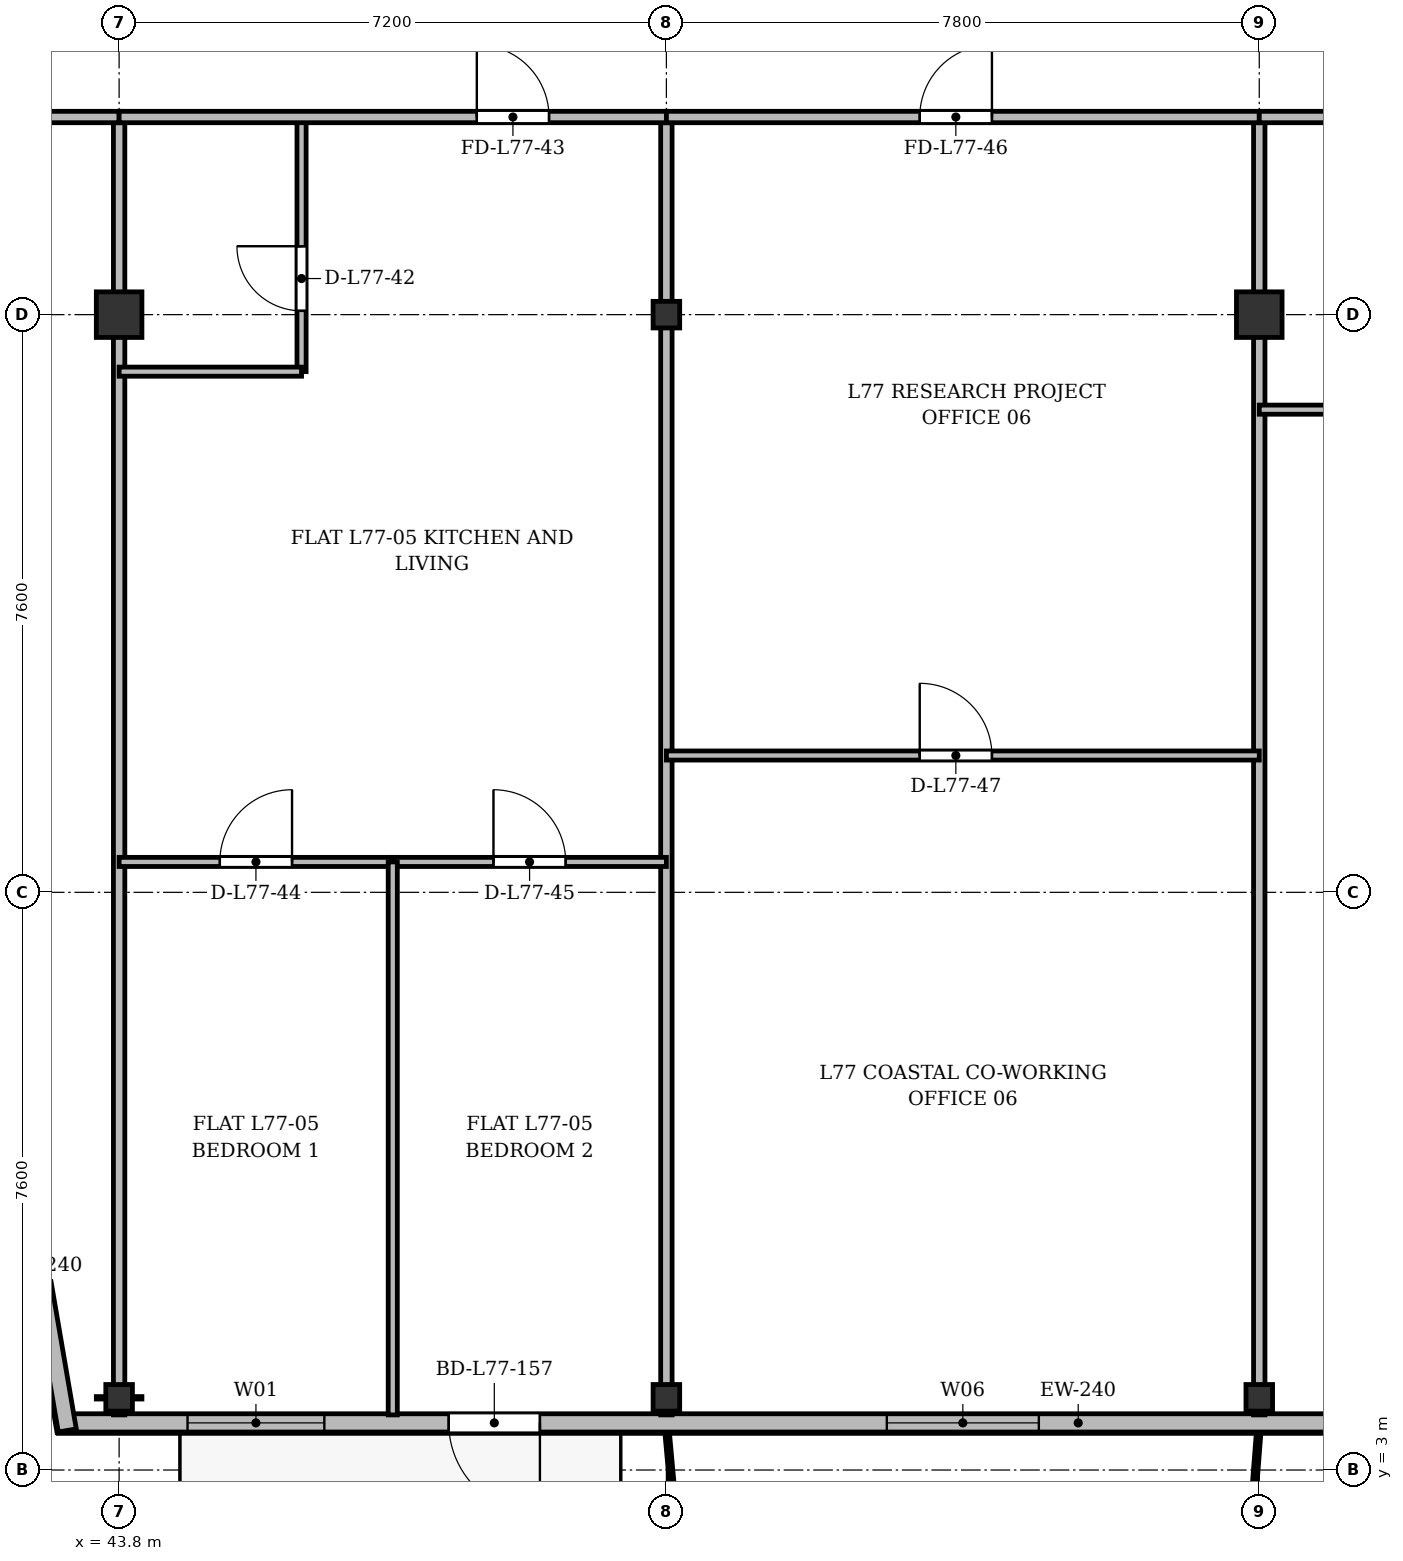
"""IFC4 building model, lengths in metres.
Left out: names, types, materials, properties, quantities, classifications, styles, units other than length and angle.
Written with IfcOpenShell. Run it as: python <this file> out.ifc"""

import sys

from ifc_helpers import new_model, si_unit, direction, frame, frame_2d, origin, origin_2d, place, context, subcontext, project, spatial, rectangle, i_section, extrude, source, transform, mapped, element, fill, save


model = new_model("IFC4")
c1 = context("Model", 3, precision=1e-05, world=origin(), true_north=direction((0.0, 1.0)))
c2 = subcontext(c1, "Body", "Model", "MODEL_VIEW")
j1 = project(units=[si_unit("LENGTHUNIT", "METRE"), si_unit("PLANEANGLEUNIT", "RADIAN")], contexts=[c1])
p1 = place(None, origin())
s1 = spatial("IfcSite", under=j1, at=p1, CompositionType="ELEMENT")
p2 = place(p1, origin())
s2 = spatial("IfcBuilding", under=s1, at=p2, CompositionType="ELEMENT")
p3 = place(p2, frame((0.0, 0.0, 295.5)))
s3 = spatial("IfcBuildingStorey", under=s2, at=p3, CompositionType="ELEMENT", Elevation=295.5)
m1 = source(origin(), c2, "Body", "SweptSolid", [
    extrude(i_section(OverallWidth=0.35, OverallDepth=0.35, WebThickness=0.018, FlangeThickness=0.028, at=origin_2d()), origin(), (0.0, 0.0, 1.0), 3.6),
])
p4 = place(p3, frame((43.8, 3.95, 0.0), z_axis=(0.0, 0.0, 1.0), x_axis=(1.0, 0.0, 0.0)))
e1 = element("IfcColumn", 1, at=p4, inside=s3, PredefinedType="COLUMN", context=c2, shape_type="MappedRepresentation", body=[
    mapped(m1, transform((0.0, 0.0, 0.0), x_axis=(1.0, 0.0, 0.0), y_axis=(0.0, 1.0, 0.0), z_axis=(0.0, 0.0, 1.0), scale=1.0)),
])
m2 = source(origin(), c2, "Body", "SweptSolid", [
    extrude(rectangle(XDim=0.6, YDim=0.6, at=origin_2d()), origin(), (0.0, 0.0, 1.0), 3.6),
])
p5 = place(p3, frame((43.8, 18.2, 0.0), z_axis=(0.0, 0.0, 1.0), x_axis=(1.0, 0.0, 0.0)))
e2 = element("IfcColumn", 2, at=p5, inside=s3, PredefinedType="COLUMN", context=c2, shape_type="MappedRepresentation", body=[
    mapped(m2, transform((0.0, 0.0, 0.0), x_axis=(1.0, 0.0, 0.0), y_axis=(0.0, 1.0, 0.0), z_axis=(0.0, 0.0, 1.0), scale=1.0)),
])
for number, where, z_axis, x_axis in (
    (3, (51.0, 3.95, 0.0), (0.0, 0.0, 1.0), (1.0, 0.0, 0.0)),
    (4, (51.0, 18.2, 0.0), (0.0, 0.0, 1.0), (1.0, 0.0, 0.0)),
    (5, (58.8, 3.95, 0.0), (0.0, 0.0, 1.0), (1.0, 0.0, 0.0)),
):
    element("IfcColumn", number, at=place(p3, frame(where, z_axis=z_axis, x_axis=x_axis)), inside=s3, PredefinedType="COLUMN", context=c2, shape_type="MappedRepresentation", body=[
        mapped(m1, transform((0.0, 0.0, 0.0), x_axis=(1.0, 0.0, 0.0), y_axis=(0.0, 1.0, 0.0), z_axis=(0.0, 0.0, 1.0), scale=1.0)),
    ])
p6 = place(p3, frame((58.8, 18.2, 0.0), z_axis=(0.0, 0.0, 1.0), x_axis=(1.0, 0.0, 0.0)))
e6 = element("IfcColumn", 6, at=p6, inside=s3, PredefinedType="COLUMN", context=c2, shape_type="MappedRepresentation", body=[
    mapped(m2, transform((0.0, 0.0, 0.0), x_axis=(1.0, 0.0, 0.0), y_axis=(0.0, 1.0, 0.0), z_axis=(0.0, 0.0, 1.0), scale=1.0)),
])
p7 = place(p3, frame((63.2, 3.62, 0.0), z_axis=(0.0, 0.0, 1.0), x_axis=(-1.0, 0.0, 0.0)))
e7 = element("IfcWall", 7, at=p7, inside=s3, PredefinedType="SOLIDWALL", context=c2, shape_type="SweptSolid", body=[
    extrude(rectangle(XDim=20.2, YDim=0.24, at=frame_2d((10.1, 0.0))), origin(), (0.0, 0.0, 1.0), 3.26),
])
p8 = place(p7, frame((1.495, 0.0, 0.9)))
e8 = element("IfcOpeningElement", 8, at=p8, cuts=e7, PredefinedType="OPENING", context=c2, shape_type="SweptSolid", body=[
    extrude(rectangle(XDim=1.5, YDim=1.75, at=frame_2d((0.75, 0.875))), frame((0.0, 0.13, 0.0), z_axis=(0.0, -1.0, 0.0), x_axis=(1.0, 0.0, 0.0)), (0.0, 0.0, 1.0), 0.26),
])
p9 = place(p7, frame((7.3, 0.0, 0.9)))
e9 = element("IfcOpeningElement", 9, at=p9, cuts=e7, PredefinedType="OPENING", context=c2, shape_type="SweptSolid", body=[
    extrude(rectangle(XDim=2.0, YDim=1.95, at=frame_2d((1.0, 0.975))), frame((0.0, 0.13, 0.0), z_axis=(0.0, -1.0, 0.0), x_axis=(1.0, 0.0, 0.0)), (0.0, 0.0, 1.0), 0.26),
])
p10 = place(p7, frame((13.864, 0.0, 0.0)))
e10 = element("IfcOpeningElement", 10, at=p10, cuts=e7, PredefinedType="OPENING", context=c2, shape_type="SweptSolid", body=[
    extrude(rectangle(XDim=1.2, YDim=2.2, at=frame_2d((0.6, 1.1))), frame((0.0, 0.13, 0.0), z_axis=(0.0, -1.0, 0.0), x_axis=(1.0, 0.0, 0.0)), (0.0, 0.0, 1.0), 0.26),
])
p11 = place(p7, frame((16.7, 0.0, 0.9)))
e11 = element("IfcOpeningElement", 11, at=p11, cuts=e7, PredefinedType="OPENING", context=c2, shape_type="SweptSolid", body=[
    extrude(rectangle(XDim=1.8, YDim=1.8, at=frame_2d((0.9, 0.9))), frame((0.0, 0.13, 0.0), z_axis=(0.0, -1.0, 0.0), x_axis=(1.0, 0.0, 0.0)), (0.0, 0.0, 1.0), 0.26),
])
p12 = place(p3, frame((43.118, 3.52, 0.0), z_axis=(0.0, 0.0, 1.0), x_axis=(-0.168990530437, 0.98561767467, 0.0)))
e12 = element("IfcWall", 12, at=p12, inside=s3, PredefinedType="SOLIDWALL", context=c2, shape_type="SweptSolid", body=[
    extrude(rectangle(XDim=3.551, YDim=0.24, at=frame_2d((1.775, 0.0))), origin(), (0.0, 0.0, 1.0), 2.81),
])
for number, where, z_axis, x_axis in (
    (13, (43.8, 3.725, 0.0), (0.0, 0.0, 1.0), (0.0, 1.0, 0.0)),
    (14, (51.0, 3.725, 0.0), (0.0, 0.0, 1.0), (0.0, 1.0, 0.0)),
    (15, (58.8, 3.725, 0.0), (0.0, 0.0, 1.0), (0.0, 1.0, 0.0)),
):
    element("IfcWall", number, at=place(p3, frame(where, z_axis=z_axis, x_axis=x_axis)), inside=s3, PredefinedType="PARTITIONING", context=c2, shape_type="SweptSolid", body=[
        extrude(rectangle(XDim=17.075, YDim=0.15, at=frame_2d((8.538, 0.0))), origin(), (0.0, 0.0, 1.0), 2.76),
    ])
p13 = place(p3, frame((33.2, 20.8, 0.0), z_axis=(0.0, 0.0, 1.0), x_axis=(1.0, 0.0, 0.0)))
e16 = element("IfcWall", 16, at=p13, inside=s3, PredefinedType="PARTITIONING", context=c2, shape_type="SweptSolid", body=[
    extrude(rectangle(XDim=10.6, YDim=0.15, at=frame_2d((5.3, 0.0))), origin(), (0.0, 0.0, 1.0), 2.76),
])
p14 = place(p13, frame((4.408, 0.0, 0.0)))
e17 = element("IfcOpeningElement", 17, at=p14, cuts=e16, PredefinedType="OPENING", context=c2, shape_type="SweptSolid", body=[
    extrude(rectangle(XDim=1.6, YDim=2.2, at=frame_2d((0.8, 1.1))), frame((0.0, 0.085, 0.0), z_axis=(0.0, -1.0, 0.0), x_axis=(1.0, 0.0, 0.0)), (0.0, 0.0, 1.0), 0.17),
])
p15 = place(p3, frame((46.2, 17.45, 0.0), z_axis=(0.0, 0.0, 1.0), x_axis=(0.0, 1.0, 0.0)))
e18 = element("IfcWall", 18, at=p15, inside=s3, PredefinedType="PARTITIONING", context=c2, shape_type="SweptSolid", body=[
    extrude(rectangle(XDim=3.35, YDim=0.12, at=frame_2d((1.675, 0.0))), origin(), (0.0, 0.0, 1.0), 2.81),
])
p16 = place(p15, frame((0.8, 0.0, 0.0)))
e19 = element("IfcOpeningElement", 19, at=p16, cuts=e18, PredefinedType="OPENING", context=c2, shape_type="SweptSolid", body=[
    extrude(rectangle(XDim=0.85, YDim=2.1, at=frame_2d((0.425, 1.05))), frame((0.0, 0.07, 0.0), z_axis=(0.0, -1.0, 0.0), x_axis=(1.0, 0.0, 0.0)), (0.0, 0.0, 1.0), 0.14),
])
p17 = place(p3, frame((43.8, 17.45, 0.0), z_axis=(0.0, 0.0, 1.0), x_axis=(1.0, 0.0, 0.0)))
e20 = element("IfcWall", 20, at=p17, inside=s3, PredefinedType="PARTITIONING", context=c2, shape_type="SweptSolid", body=[
    extrude(rectangle(XDim=2.4, YDim=0.12, at=frame_2d((1.2, 0.0))), origin(), (0.0, 0.0, 1.0), 2.76),
])
p18 = place(p3, frame((43.8, 20.8, 0.0), z_axis=(0.0, 0.0, 1.0), x_axis=(1.0, 0.0, 0.0)))
e21 = element("IfcWall", 21, at=p18, inside=s3, PredefinedType="PARTITIONING", context=c2, shape_type="SweptSolid", body=[
    extrude(rectangle(XDim=7.2, YDim=0.15, at=frame_2d((3.6, 0.0))), origin(), (0.0, 0.0, 1.0), 2.76),
])
p19 = place(p18, frame((4.706, 0.0, 0.0)))
e22 = element("IfcOpeningElement", 22, at=p19, cuts=e21, PredefinedType="OPENING", context=c2, shape_type="SweptSolid", body=[
    extrude(rectangle(XDim=0.95, YDim=2.15, at=frame_2d((0.475, 1.075))), frame((0.0, 0.085, 0.0), z_axis=(0.0, -1.0, 0.0), x_axis=(1.0, 0.0, 0.0)), (0.0, 0.0, 1.0), 0.17),
])
p20 = place(p3, frame((43.8, 11.0, 0.0), z_axis=(0.0, 0.0, 1.0), x_axis=(1.0, 0.0, 0.0)))
e23 = element("IfcWall", 23, at=p20, inside=s3, PredefinedType="PARTITIONING", context=c2, shape_type="SweptSolid", body=[
    extrude(rectangle(XDim=3.6, YDim=0.12, at=frame_2d((1.8, 0.0))), origin(), (0.0, 0.0, 1.0), 2.76),
])
p21 = place(p20, frame((1.325, 0.0, 0.0)))
e24 = element("IfcOpeningElement", 24, at=p21, cuts=e23, PredefinedType="OPENING", context=c2, shape_type="SweptSolid", body=[
    extrude(rectangle(XDim=0.95, YDim=2.15, at=frame_2d((0.475, 1.075))), frame((0.0, 0.07, 0.0), z_axis=(0.0, -1.0, 0.0), x_axis=(1.0, 0.0, 0.0)), (0.0, 0.0, 1.0), 0.14),
])
p22 = place(p3, frame((47.4, 11.0, 0.0), z_axis=(0.0, 0.0, 1.0), x_axis=(1.0, 0.0, 0.0)))
e25 = element("IfcWall", 25, at=p22, inside=s3, PredefinedType="PARTITIONING", context=c2, shape_type="SweptSolid", body=[
    extrude(rectangle(XDim=3.6, YDim=0.12, at=frame_2d((1.8, 0.0))), origin(), (0.0, 0.0, 1.0), 2.76),
])
p23 = place(p22, frame((1.325, 0.0, 0.0)))
e26 = element("IfcOpeningElement", 26, at=p23, cuts=e25, PredefinedType="OPENING", context=c2, shape_type="SweptSolid", body=[
    extrude(rectangle(XDim=0.95, YDim=2.15, at=frame_2d((0.475, 1.075))), frame((0.0, 0.07, 0.0), z_axis=(0.0, -1.0, 0.0), x_axis=(1.0, 0.0, 0.0)), (0.0, 0.0, 1.0), 0.14),
])
p24 = place(p3, frame((47.4, 3.725, 0.0), z_axis=(0.0, 0.0, 1.0), x_axis=(0.0, 1.0, 0.0)))
e27 = element("IfcWall", 27, at=p24, inside=s3, PredefinedType="PARTITIONING", context=c2, shape_type="SweptSolid", body=[
    extrude(rectangle(XDim=7.275, YDim=0.12, at=frame_2d((3.637, 0.0))), origin(), (0.0, 0.0, 1.0), 2.81),
])
p25 = place(p3, frame((51.0, 20.8, 0.0), z_axis=(0.0, 0.0, 1.0), x_axis=(1.0, 0.0, 0.0)))
e28 = element("IfcWall", 28, at=p25, inside=s3, PredefinedType="PARTITIONING", context=c2, shape_type="SweptSolid", body=[
    extrude(rectangle(XDim=7.8, YDim=0.15, at=frame_2d((3.9, 0.0))), origin(), (0.0, 0.0, 1.0), 2.76),
])
p26 = place(p25, frame((3.333, 0.0, 0.0)))
e29 = element("IfcOpeningElement", 29, at=p26, cuts=e28, PredefinedType="OPENING", context=c2, shape_type="SweptSolid", body=[
    extrude(rectangle(XDim=0.95, YDim=2.15, at=frame_2d((0.475, 1.075))), frame((0.0, 0.085, 0.0), z_axis=(0.0, -1.0, 0.0), x_axis=(1.0, 0.0, 0.0)), (0.0, 0.0, 1.0), 0.17),
])
p27 = place(p3, frame((51.0, 12.4, 0.0), z_axis=(0.0, 0.0, 1.0), x_axis=(1.0, 0.0, 0.0)))
e30 = element("IfcWall", 30, at=p27, inside=s3, PredefinedType="PARTITIONING", context=c2, shape_type="SweptSolid", body=[
    extrude(rectangle(XDim=7.8, YDim=0.12, at=frame_2d((3.9, 0.0))), origin(), (0.0, 0.0, 1.0), 2.76),
])
p28 = place(p27, frame((3.333, 0.0, 0.0)))
e31 = element("IfcOpeningElement", 31, at=p28, cuts=e30, PredefinedType="OPENING", context=c2, shape_type="SweptSolid", body=[
    extrude(rectangle(XDim=0.95, YDim=2.15, at=frame_2d((0.475, 1.075))), frame((0.0, 0.07, 0.0), z_axis=(0.0, -1.0, 0.0), x_axis=(1.0, 0.0, 0.0)), (0.0, 0.0, 1.0), 0.14),
])
p29 = place(p3, frame((58.8, 20.8, 0.0), z_axis=(0.0, 0.0, 1.0), x_axis=(1.0, 0.0, 0.0)))
e32 = element("IfcWall", 32, at=p29, inside=s3, PredefinedType="PARTITIONING", context=c2, shape_type="SweptSolid", body=[
    extrude(rectangle(XDim=7.175, YDim=0.15, at=frame_2d((3.587, 0.0))), origin(), (0.0, 0.0, 1.0), 2.76),
])
p30 = place(p29, frame((3.112, 0.0, 0.0)))
e33 = element("IfcOpeningElement", 33, at=p30, cuts=e32, PredefinedType="OPENING", context=c2, shape_type="SweptSolid", body=[
    extrude(rectangle(XDim=0.95, YDim=2.15, at=frame_2d((0.475, 1.075))), frame((0.0, 0.085, 0.0), z_axis=(0.0, -1.0, 0.0), x_axis=(1.0, 0.0, 0.0)), (0.0, 0.0, 1.0), 0.17),
])
p31 = place(p3, frame((58.8, 16.95, 0.0), z_axis=(0.0, 0.0, 1.0), x_axis=(1.0, 0.0, 0.0)))
e34 = element("IfcWall", 34, at=p31, inside=s3, PredefinedType="PARTITIONING", context=c2, shape_type="SweptSolid", body=[
    extrude(rectangle(XDim=7.175, YDim=0.12, at=frame_2d((3.587, 0.0))), origin(), (0.0, 0.0, 1.0), 2.76),
])
p32 = place(p31, frame((3.112, 0.0, 0.0)))
e35 = element("IfcOpeningElement", 35, at=p32, cuts=e34, PredefinedType="OPENING", context=c2, shape_type="SweptSolid", body=[
    extrude(rectangle(XDim=0.95, YDim=2.15, at=frame_2d((0.475, 1.075))), frame((0.0, 0.07, 0.0), z_axis=(0.0, -1.0, 0.0), x_axis=(1.0, 0.0, 0.0)), (0.0, 0.0, 1.0), 0.14),
])
m3 = source(origin(), c2, "Body", "SweptSolid", [
    extrude(rectangle(XDim=2.0, YDim=1.95, at=frame_2d((1.0, 0.975))), frame((0.0, 0.03, 0.0), z_axis=(0.0, -1.0, 0.0), x_axis=(1.0, 0.0, 0.0)), (0.0, 0.0, 1.0), 0.06),
])
p33 = place(p9, origin())
e36 = element("IfcWindow", 36, at=p33, inside=s3, PartitioningType="SINGLE_PANEL", PredefinedType="WINDOW", context=c2, shape_type="MappedRepresentation", body=[
    mapped(m3, transform((0.0, 0.0, 0.0), x_axis=(1.0, 0.0, 0.0), y_axis=(0.0, 1.0, 0.0), z_axis=(0.0, 0.0, 1.0), scale=1.0)),
])
fill(e9, e36)
m4 = source(origin(), c2, "Body", "SweptSolid", [
    extrude(rectangle(XDim=1.2, YDim=2.2, at=frame_2d((0.6, 1.1))), frame((0.0, 0.025, 0.0), z_axis=(0.0, -1.0, 0.0), x_axis=(1.0, 0.0, 0.0)), (0.0, 0.0, 1.0), 0.05),
])
p34 = place(p10, origin())
e37 = element("IfcDoor", 37, at=p34, inside=s3, OperationType="SINGLE_SWING_LEFT", PredefinedType="DOOR", context=c2, shape_type="MappedRepresentation", body=[
    mapped(m4, transform((0.0, 0.0, 0.0), x_axis=(1.0, 0.0, 0.0), y_axis=(0.0, 1.0, 0.0), z_axis=(0.0, 0.0, 1.0), scale=1.0)),
])
fill(e10, e37)
m5 = source(origin(), c2, "Body", "SweptSolid", [
    extrude(rectangle(XDim=1.8, YDim=1.8, at=frame_2d((0.9, 0.9))), frame((0.0, 0.03, 0.0), z_axis=(0.0, -1.0, 0.0), x_axis=(1.0, 0.0, 0.0)), (0.0, 0.0, 1.0), 0.06),
])
p35 = place(p11, origin())
e38 = element("IfcWindow", 38, at=p35, inside=s3, PartitioningType="SINGLE_PANEL", PredefinedType="WINDOW", context=c2, shape_type="MappedRepresentation", body=[
    mapped(m5, transform((0.0, 0.0, 0.0), x_axis=(1.0, 0.0, 0.0), y_axis=(0.0, 1.0, 0.0), z_axis=(0.0, 0.0, 1.0), scale=1.0)),
])
fill(e11, e38)
m6 = source(origin(), c2, "Body", "SweptSolid", [
    extrude(rectangle(XDim=0.85, YDim=2.1, at=frame_2d((0.425, 1.05))), frame((0.0, 0.025, 0.0), z_axis=(0.0, -1.0, 0.0), x_axis=(1.0, 0.0, 0.0)), (0.0, 0.0, 1.0), 0.05),
])
p36 = place(p16, origin())
e39 = element("IfcDoor", 39, at=p36, inside=s3, OperationType="SINGLE_SWING_RIGHT", PredefinedType="DOOR", context=c2, shape_type="MappedRepresentation", body=[
    mapped(m6, transform((0.0, 0.0, 0.0), x_axis=(1.0, 0.0, 0.0), y_axis=(0.0, 1.0, 0.0), z_axis=(0.0, 0.0, 1.0), scale=1.0)),
])
fill(e19, e39)
m7 = source(origin(), c2, "Body", "SweptSolid", [
    extrude(rectangle(XDim=0.95, YDim=2.15, at=frame_2d((0.475, 1.075))), frame((0.0, 0.025, 0.0), z_axis=(0.0, -1.0, 0.0), x_axis=(1.0, 0.0, 0.0)), (0.0, 0.0, 1.0), 0.05),
])
p37 = place(p19, origin())
e40 = element("IfcDoor", 40, at=p37, inside=s3, OperationType="SINGLE_SWING_LEFT", PredefinedType="DOOR", context=c2, shape_type="MappedRepresentation", body=[
    mapped(m7, transform((0.0, 0.0, 0.0), x_axis=(1.0, 0.0, 0.0), y_axis=(0.0, 1.0, 0.0), z_axis=(0.0, 0.0, 1.0), scale=1.0)),
])
fill(e22, e40)
p38 = place(p21, origin())
e41 = element("IfcDoor", 41, at=p38, inside=s3, OperationType="SINGLE_SWING_RIGHT", PredefinedType="DOOR", context=c2, shape_type="MappedRepresentation", body=[
    mapped(m7, transform((0.0, 0.0, 0.0), x_axis=(1.0, 0.0, 0.0), y_axis=(0.0, 1.0, 0.0), z_axis=(0.0, 0.0, 1.0), scale=1.0)),
])
fill(e24, e41)
p39 = place(p23, origin())
e42 = element("IfcDoor", 42, at=p39, inside=s3, OperationType="SINGLE_SWING_LEFT", PredefinedType="DOOR", context=c2, shape_type="MappedRepresentation", body=[
    mapped(m7, transform((0.0, 0.0, 0.0), x_axis=(1.0, 0.0, 0.0), y_axis=(0.0, 1.0, 0.0), z_axis=(0.0, 0.0, 1.0), scale=1.0)),
])
fill(e26, e42)
p40 = place(p26, origin())
e43 = element("IfcDoor", 43, at=p40, inside=s3, OperationType="SINGLE_SWING_RIGHT", PredefinedType="DOOR", context=c2, shape_type="MappedRepresentation", body=[
    mapped(m7, transform((0.0, 0.0, 0.0), x_axis=(1.0, 0.0, 0.0), y_axis=(0.0, 1.0, 0.0), z_axis=(0.0, 0.0, 1.0), scale=1.0)),
])
fill(e29, e43)
p41 = place(p28, origin())
e44 = element("IfcDoor", 44, at=p41, inside=s3, OperationType="SINGLE_SWING_LEFT", PredefinedType="DOOR", context=c2, shape_type="MappedRepresentation", body=[
    mapped(m7, transform((0.0, 0.0, 0.0), x_axis=(1.0, 0.0, 0.0), y_axis=(0.0, 1.0, 0.0), z_axis=(0.0, 0.0, 1.0), scale=1.0)),
])
fill(e31, e44)
save(model, sys.argv[1])
